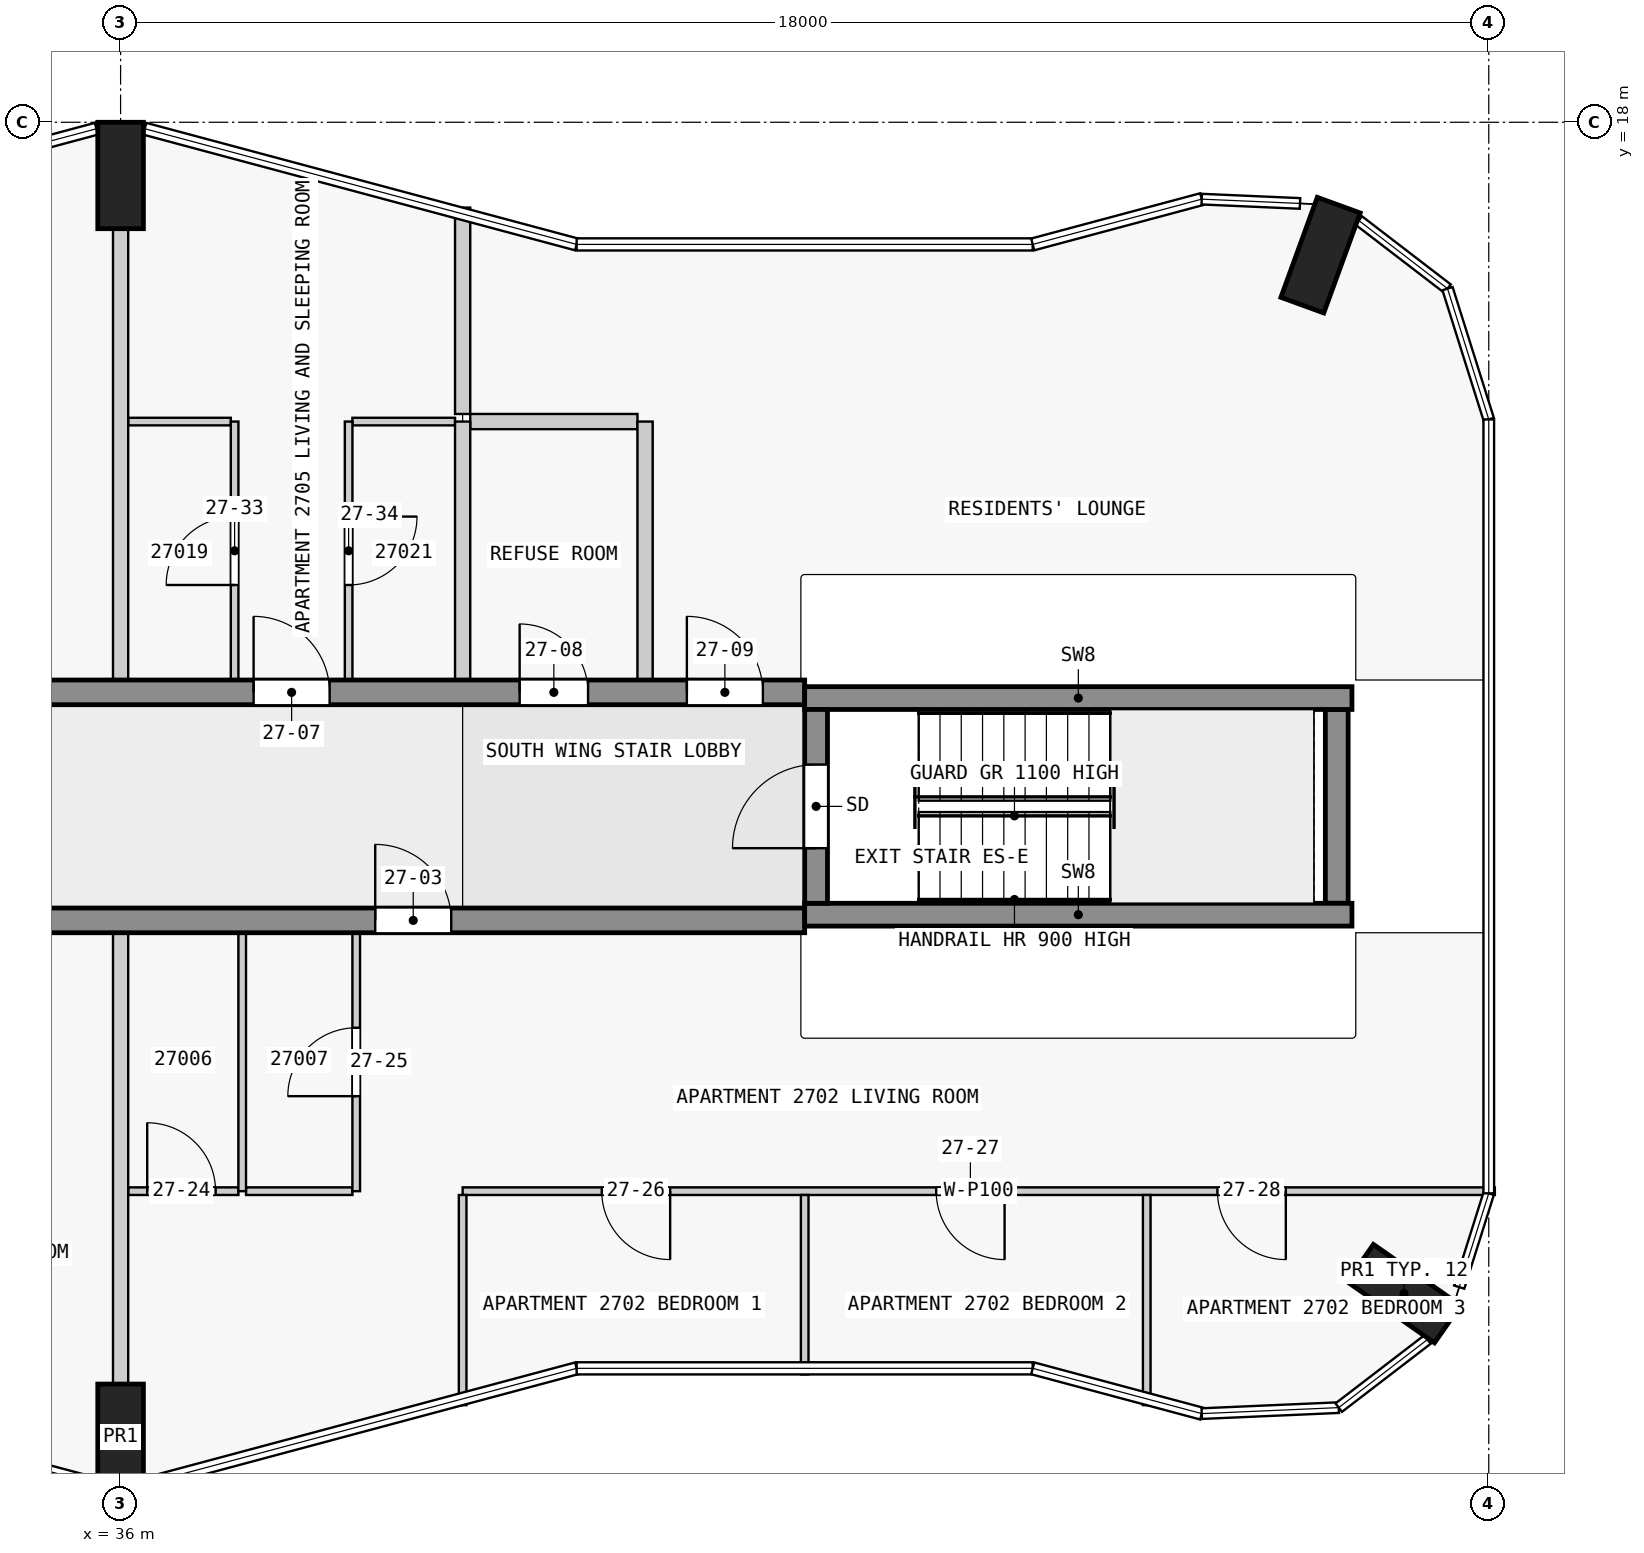
"""IFC4 building model, lengths in metres.
Left out: names, types, materials, properties, quantities, classifications, styles, units other than length and angle.
Written with IfcOpenShell. Run it as: python <this file> out.ifc"""

import sys

from ifc_helpers import new_model, si_unit, direction, frame, frame_2d, origin, origin_2d, place, context, subcontext, project, spatial, rectangle, extrude, element, fill, save


model = new_model("IFC4")
c1 = context("Model", 3, precision=1e-05, world=origin(), true_north=direction((0.0, 1.0)))
c2 = subcontext(c1, "Body", "Model", "MODEL_VIEW")
j1 = project(units=[si_unit("LENGTHUNIT", "METRE"), si_unit("PLANEANGLEUNIT", "RADIAN")], contexts=[c1])
p1 = place(None, origin())
s1 = spatial("IfcSite", under=j1, at=p1, CompositionType="ELEMENT")
p2 = place(p1, origin())
s2 = spatial("IfcBuilding", under=s1, at=p2, CompositionType="ELEMENT")
p3 = place(p2, frame((0.0, 0.0, 106.3)))
s3 = spatial("IfcBuildingStorey", under=s2, at=p3, CompositionType="ELEMENT", Elevation=106.3)
for number, where, z_axis, x_axis in (
    (1, (36.0, 0.7, 0.0), (0.0, 0.0, 1.0), (1.0, 0.0, 0.0)),
    (2, (52.884, 2.59, 0.0), (0.0, 0.0, 1.0), (0.574, 0.819, 0.0)),
    (3, (51.787, 16.252, 0.0), (0.0, 0.0, 1.0), (-0.94, 0.342, 0.0)),
    (4, (36.0, 17.3, 0.0), (0.0, 0.0, 1.0), (1.0, 0.0, 0.0)),
):
    element("IfcColumn", number, at=place(p3, frame(where, z_axis=z_axis, x_axis=x_axis)), inside=s3, PredefinedType="COLUMN", context=c2, shape_type="SweptSolid", body=[
        extrude(rectangle(XDim=0.6, YDim=1.4, at=origin_2d()), origin(), (0.0, 0.0, 1.0), 3.5),
    ])
p4 = place(p3, frame((45.15, 7.725, 0.0), z_axis=(0.0, 0.0, 1.0), x_axis=(0.0, 1.0, 0.0)))
e5 = element("IfcWall", 5, at=p4, inside=s3, PredefinedType="SHEAR", context=c2, shape_type="SweptSolid", body=[
    extrude(rectangle(XDim=2.55, YDim=0.3, at=frame_2d((1.275, 0.0))), origin(), (0.0, 0.0, 1.0), 3.5),
])
p5 = place(p4, frame((0.725, 0.0, 0.0)))
e6 = element("IfcOpeningElement", 6, at=p5, cuts=e5, PredefinedType="OPENING", context=c2, shape_type="SweptSolid", body=[
    extrude(rectangle(XDim=1.1, YDim=2.1, at=frame_2d((0.55, 1.05))), frame((0.0, 0.16, 0.0), z_axis=(0.0, -1.0, 0.0), x_axis=(1.0, 0.0, 0.0)), (0.0, 0.0, 1.0), 0.32),
])
p6 = place(p3, frame((52.0, 7.725, 0.0), z_axis=(0.0, 0.0, 1.0), x_axis=(0.0, 1.0, 0.0)))
e7 = element("IfcWall", 7, at=p6, inside=s3, PredefinedType="SHEAR", context=c2, shape_type="SweptSolid", body=[
    extrude(rectangle(XDim=2.55, YDim=0.3, at=frame_2d((1.275, 0.0))), origin(), (0.0, 0.0, 1.0), 3.5),
])
for number, where, z_axis, x_axis in (
    (8, (45.0, 7.575, 0.0), (0.0, 0.0, 1.0), (1.0, 0.0, 0.0)),
    (9, (45.0, 10.425, 0.0), (0.0, 0.0, 1.0), (1.0, 0.0, 0.0)),
):
    element("IfcWall", number, at=place(p3, frame(where, z_axis=z_axis, x_axis=x_axis)), inside=s3, PredefinedType="SHEAR", context=c2, shape_type="SweptSolid", body=[
        extrude(rectangle(XDim=7.2, YDim=0.3, at=frame_2d((3.6, 0.0))), origin(), (0.0, 0.0, 1.0), 3.5),
    ])
p7 = place(p3, frame((22.5, 7.5, 0.0), z_axis=(0.0, 0.0, 1.0), x_axis=(1.0, 0.0, 0.0)))
e10 = element("IfcWall", 10, at=p7, inside=s3, PredefinedType="SHEAR", context=c2, shape_type="SweptSolid", body=[
    extrude(rectangle(XDim=22.5, YDim=0.325, at=frame_2d((11.25, 0.0))), origin(), (0.0, 0.0, 1.0), 3.25),
])
p8 = place(p7, frame((4.05, 0.0, 0.0)))
e11 = element("IfcOpeningElement", 11, at=p8, cuts=e10, PredefinedType="OPENING", context=c2, shape_type="SweptSolid", body=[
    extrude(rectangle(XDim=1.0, YDim=2.1, at=frame_2d((0.5, 1.05))), frame((0.0, 0.172, 0.0), z_axis=(0.0, -1.0, 0.0), x_axis=(1.0, 0.0, 0.0)), (0.0, 0.0, 1.0), 0.345),
])
p9 = place(p7, frame((10.75, 0.0, 0.0)))
e12 = element("IfcOpeningElement", 12, at=p9, cuts=e10, PredefinedType="OPENING", context=c2, shape_type="SweptSolid", body=[
    extrude(rectangle(XDim=1.0, YDim=2.1, at=frame_2d((0.5, 1.05))), frame((0.0, 0.172, 0.0), z_axis=(0.0, -1.0, 0.0), x_axis=(1.0, 0.0, 0.0)), (0.0, 0.0, 1.0), 0.345),
])
p10 = place(p7, frame((16.85, 0.0, 0.0)))
e13 = element("IfcOpeningElement", 13, at=p10, cuts=e10, PredefinedType="OPENING", context=c2, shape_type="SweptSolid", body=[
    extrude(rectangle(XDim=1.0, YDim=2.1, at=frame_2d((0.5, 1.05))), frame((0.0, 0.172, 0.0), z_axis=(0.0, -1.0, 0.0), x_axis=(1.0, 0.0, 0.0)), (0.0, 0.0, 1.0), 0.345),
])
p11 = place(p3, frame((22.5, 10.5, 0.0), z_axis=(0.0, 0.0, 1.0), x_axis=(1.0, 0.0, 0.0)))
e14 = element("IfcWall", 14, at=p11, inside=s3, PredefinedType="SHEAR", context=c2, shape_type="SweptSolid", body=[
    extrude(rectangle(XDim=22.5, YDim=0.325, at=frame_2d((11.25, 0.0))), origin(), (0.0, 0.0, 1.0), 3.25),
])
p12 = place(p11, frame((1.75, 0.0, 0.0)))
e15 = element("IfcOpeningElement", 15, at=p12, cuts=e14, PredefinedType="OPENING", context=c2, shape_type="SweptSolid", body=[
    extrude(rectangle(XDim=1.0, YDim=2.1, at=frame_2d((0.5, 1.05))), frame((0.0, 0.172, 0.0), z_axis=(0.0, -1.0, 0.0), x_axis=(1.0, 0.0, 0.0)), (0.0, 0.0, 1.0), 0.345),
])
p13 = place(p11, frame((6.25, 0.0, 0.0)))
e16 = element("IfcOpeningElement", 16, at=p13, cuts=e14, PredefinedType="OPENING", context=c2, shape_type="SweptSolid", body=[
    extrude(rectangle(XDim=1.0, YDim=2.1, at=frame_2d((0.5, 1.05))), frame((0.0, 0.172, 0.0), z_axis=(0.0, -1.0, 0.0), x_axis=(1.0, 0.0, 0.0)), (0.0, 0.0, 1.0), 0.345),
])
p14 = place(p11, frame((10.85, 0.0, 0.0)))
e17 = element("IfcOpeningElement", 17, at=p14, cuts=e14, PredefinedType="OPENING", context=c2, shape_type="SweptSolid", body=[
    extrude(rectangle(XDim=0.9, YDim=2.1, at=frame_2d((0.45, 1.05))), frame((0.0, 0.172, 0.0), z_axis=(0.0, -1.0, 0.0), x_axis=(1.0, 0.0, 0.0)), (0.0, 0.0, 1.0), 0.345),
])
p15 = place(p11, frame((15.25, 0.0, 0.0)))
e18 = element("IfcOpeningElement", 18, at=p15, cuts=e14, PredefinedType="OPENING", context=c2, shape_type="SweptSolid", body=[
    extrude(rectangle(XDim=1.0, YDim=2.1, at=frame_2d((0.5, 1.05))), frame((0.0, 0.172, 0.0), z_axis=(0.0, -1.0, 0.0), x_axis=(1.0, 0.0, 0.0)), (0.0, 0.0, 1.0), 0.345),
])
p16 = place(p11, frame((18.75, 0.0, 0.0)))
e19 = element("IfcOpeningElement", 19, at=p16, cuts=e14, PredefinedType="OPENING", context=c2, shape_type="SweptSolid", body=[
    extrude(rectangle(XDim=0.9, YDim=2.1, at=frame_2d((0.45, 1.05))), frame((0.0, 0.172, 0.0), z_axis=(0.0, -1.0, 0.0), x_axis=(1.0, 0.0, 0.0)), (0.0, 0.0, 1.0), 0.345),
])
p17 = place(p11, frame((20.95, 0.0, 0.0)))
e20 = element("IfcOpeningElement", 20, at=p17, cuts=e14, PredefinedType="OPENING", context=c2, shape_type="SweptSolid", body=[
    extrude(rectangle(XDim=1.0, YDim=2.1, at=frame_2d((0.5, 1.05))), frame((0.0, 0.172, 0.0), z_axis=(0.0, -1.0, 0.0), x_axis=(1.0, 0.0, 0.0)), (0.0, 0.0, 1.0), 0.345),
])
p18 = place(p3, frame((54.08, 3.938, 0.0), z_axis=(0.0, 0.0, 1.0), x_axis=(-1.0, 0.0, 0.0)))
e21 = element("IfcWall", 21, at=p18, inside=s3, PredefinedType="PARTITIONING", context=c2, shape_type="SweptSolid", body=[
    extrude(rectangle(XDim=13.58, YDim=0.1, at=frame_2d((6.79, 0.0))), origin(), (0.0, 0.0, 1.0), 3.25),
])
p19 = place(p18, frame((10.85, 0.0, 0.0)))
e22 = element("IfcOpeningElement", 22, at=p19, cuts=e21, PredefinedType="OPENING", context=c2, shape_type="SweptSolid", body=[
    extrude(rectangle(XDim=0.9, YDim=2.1, at=frame_2d((0.45, 1.05))), frame((0.0, 0.06, 0.0), z_axis=(0.0, -1.0, 0.0), x_axis=(1.0, 0.0, 0.0)), (0.0, 0.0, 1.0), 0.12),
])
p20 = place(p18, frame((6.45, 0.0, 0.0)))
e23 = element("IfcOpeningElement", 23, at=p20, cuts=e21, PredefinedType="OPENING", context=c2, shape_type="SweptSolid", body=[
    extrude(rectangle(XDim=0.9, YDim=2.1, at=frame_2d((0.45, 1.05))), frame((0.0, 0.06, 0.0), z_axis=(0.0, -1.0, 0.0), x_axis=(1.0, 0.0, 0.0)), (0.0, 0.0, 1.0), 0.12),
])
p21 = place(p18, frame((2.75, 0.0, 0.0)))
e24 = element("IfcOpeningElement", 24, at=p21, cuts=e21, PredefinedType="OPENING", context=c2, shape_type="SweptSolid", body=[
    extrude(rectangle(XDim=0.9, YDim=2.1, at=frame_2d((0.45, 1.05))), frame((0.0, 0.06, 0.0), z_axis=(0.0, -1.0, 0.0), x_axis=(1.0, 0.0, 0.0)), (0.0, 0.0, 1.0), 0.12),
])
p22 = place(p3, frame((36.1, 3.938, 0.0), z_axis=(0.0, 0.0, 1.0), x_axis=(1.0, 0.0, 0.0)))
e25 = element("IfcWall", 25, at=p22, inside=s3, PredefinedType="PARTITIONING", context=c2, shape_type="SweptSolid", body=[
    extrude(rectangle(XDim=1.45, YDim=0.1, at=frame_2d((0.725, 0.0))), origin(), (0.0, 0.0, 1.0), 3.25),
])
p23 = place(p22, frame((0.25, 0.0, 0.0)))
e26 = element("IfcOpeningElement", 26, at=p23, cuts=e25, PredefinedType="OPENING", context=c2, shape_type="SweptSolid", body=[
    extrude(rectangle(XDim=0.9, YDim=2.1, at=frame_2d((0.45, 1.05))), frame((0.0, 0.06, 0.0), z_axis=(0.0, -1.0, 0.0), x_axis=(1.0, 0.0, 0.0)), (0.0, 0.0, 1.0), 0.12),
])
p24 = place(p3, frame((37.65, 3.938, 0.0), z_axis=(0.0, 0.0, 1.0), x_axis=(1.0, 0.0, 0.0)))
e27 = element("IfcWall", 27, at=p24, inside=s3, PredefinedType="PARTITIONING", context=c2, shape_type="SweptSolid", body=[
    extrude(rectangle(XDim=1.4, YDim=0.1, at=frame_2d((0.7, 0.0))), origin(), (0.0, 0.0, 1.0), 3.25),
])
for number, where, z_axis, x_axis in (
    (28, (37.45, 14.062, 0.0), (0.0, 0.0, 1.0), (-1.0, 0.0, 0.0)),
    (29, (40.4, 14.062, 0.0), (0.0, 0.0, 1.0), (-1.0, 0.0, 0.0)),
):
    element("IfcWall", number, at=place(p3, frame(where, z_axis=z_axis, x_axis=x_axis)), inside=s3, PredefinedType="PARTITIONING", context=c2, shape_type="SweptSolid", body=[
        extrude(rectangle(XDim=1.35, YDim=0.1, at=frame_2d((0.675, 0.0))), origin(), (0.0, 0.0, 1.0), 3.25),
    ])
p25 = place(p3, frame((42.8, 14.062, 0.0), z_axis=(0.0, 0.0, 1.0), x_axis=(-1.0, 0.0, 0.0)))
e30 = element("IfcWall", 30, at=p25, inside=s3, PredefinedType="PARTITIONING", context=c2, shape_type="SweptSolid", body=[
    extrude(rectangle(XDim=2.2, YDim=0.2, at=frame_2d((1.1, 0.0))), origin(), (0.0, 0.0, 1.0), 3.25),
])
for number, where, z_axis, x_axis in (
    (31, (36.0, 1.4, 0.0), (0.0, 0.0, 1.0), (0.0, 1.0, 0.0)),
    (32, (36.0, 10.663, 0.0), (0.0, 0.0, 1.0), (0.0, 1.0, 0.0)),
):
    element("IfcWall", number, at=place(p3, frame(where, z_axis=z_axis, x_axis=x_axis)), inside=s3, PredefinedType="PARTITIONING", context=c2, shape_type="SweptSolid", body=[
        extrude(rectangle(XDim=5.938, YDim=0.2, at=frame_2d((2.969, 0.0))), origin(), (0.0, 0.0, 1.0), 3.25),
    ])
p26 = place(p3, frame((37.5, 10.663, 0.0), z_axis=(0.0, 0.0, 1.0), x_axis=(0.0, 1.0, 0.0)))
e33 = element("IfcWall", 33, at=p26, inside=s3, PredefinedType="PARTITIONING", context=c2, shape_type="SweptSolid", body=[
    extrude(rectangle(XDim=3.4, YDim=0.1, at=frame_2d((1.7, 0.0))), origin(), (0.0, 0.0, 1.0), 3.25),
])
p27 = place(p26, frame((1.25, 0.0, 0.0)))
e34 = element("IfcOpeningElement", 34, at=p27, cuts=e33, PredefinedType="OPENING", context=c2, shape_type="SweptSolid", body=[
    extrude(rectangle(XDim=0.9, YDim=2.1, at=frame_2d((0.45, 1.05))), frame((0.0, 0.06, 0.0), z_axis=(0.0, -1.0, 0.0), x_axis=(1.0, 0.0, 0.0)), (0.0, 0.0, 1.0), 0.12),
])
p28 = place(p3, frame((37.6, 3.938, 0.0), z_axis=(0.0, 0.0, 1.0), x_axis=(0.0, 1.0, 0.0)))
e35 = element("IfcWall", 35, at=p28, inside=s3, PredefinedType="PARTITIONING", context=c2, shape_type="SweptSolid", body=[
    extrude(rectangle(XDim=3.4, YDim=0.1, at=frame_2d((1.7, 0.0))), origin(), (0.0, 0.0, 1.0), 3.25),
])
p29 = place(p3, frame((39.0, 14.062, 0.0), z_axis=(0.0, 0.0, 1.0), x_axis=(0.0, -1.0, 0.0)))
e36 = element("IfcWall", 36, at=p29, inside=s3, PredefinedType="PARTITIONING", context=c2, shape_type="SweptSolid", body=[
    extrude(rectangle(XDim=3.4, YDim=0.1, at=frame_2d((1.7, 0.0))), origin(), (0.0, 0.0, 1.0), 3.25),
])
p30 = place(p29, frame((1.25, 0.0, 0.0)))
e37 = element("IfcOpeningElement", 37, at=p30, cuts=e36, PredefinedType="OPENING", context=c2, shape_type="SweptSolid", body=[
    extrude(rectangle(XDim=0.9, YDim=2.1, at=frame_2d((0.45, 1.05))), frame((0.0, 0.06, 0.0), z_axis=(0.0, -1.0, 0.0), x_axis=(1.0, 0.0, 0.0)), (0.0, 0.0, 1.0), 0.12),
])
p31 = place(p3, frame((39.1, 3.938, 0.0), z_axis=(0.0, 0.0, 1.0), x_axis=(0.0, 1.0, 0.0)))
e38 = element("IfcWall", 38, at=p31, inside=s3, PredefinedType="PARTITIONING", context=c2, shape_type="SweptSolid", body=[
    extrude(rectangle(XDim=3.4, YDim=0.1, at=frame_2d((1.7, 0.0))), origin(), (0.0, 0.0, 1.0), 3.25),
])
p32 = place(p31, frame((1.25, 0.0, 0.0)))
e39 = element("IfcOpeningElement", 39, at=p32, cuts=e38, PredefinedType="OPENING", context=c2, shape_type="SweptSolid", body=[
    extrude(rectangle(XDim=0.9, YDim=2.1, at=frame_2d((0.45, 1.05))), frame((0.0, 0.06, 0.0), z_axis=(0.0, -1.0, 0.0), x_axis=(1.0, 0.0, 0.0)), (0.0, 0.0, 1.0), 0.12),
])
p33 = place(p3, frame((40.5, 3.887, 0.0), z_axis=(0.0, 0.0, 1.0), x_axis=(0.0, -1.0, 0.0)))
e40 = element("IfcWall", 40, at=p33, inside=s3, PredefinedType="PARTITIONING", context=c2, shape_type="SweptSolid", body=[
    extrude(rectangle(XDim=2.765, YDim=0.1, at=frame_2d((1.383, 0.0))), origin(), (0.0, 0.0, 1.0), 3.25),
])
p34 = place(p3, frame((40.5, 16.878, 0.0), z_axis=(0.0, 0.0, 1.0), x_axis=(0.0, -1.0, 0.0)))
e41 = element("IfcWall", 41, at=p34, inside=s3, PredefinedType="PARTITIONING", context=c2, shape_type="SweptSolid", body=[
    extrude(rectangle(XDim=2.715, YDim=0.2, at=frame_2d((1.357, 0.0))), origin(), (0.0, 0.0, 1.0), 3.25),
])
for number, where, z_axis, x_axis in (
    (42, (40.5, 10.663, 0.0), (0.0, 0.0, 1.0), (0.0, 1.0, 0.0)),
    (43, (42.9, 10.663, 0.0), (0.0, 0.0, 1.0), (0.0, 1.0, 0.0)),
):
    element("IfcWall", number, at=place(p3, frame(where, z_axis=z_axis, x_axis=x_axis)), inside=s3, PredefinedType="PARTITIONING", context=c2, shape_type="SweptSolid", body=[
        extrude(rectangle(XDim=3.4, YDim=0.2, at=frame_2d((1.7, 0.0))), origin(), (0.0, 0.0, 1.0), 3.25),
    ])
p35 = place(p3, frame((45.0, 1.527, 0.0), z_axis=(0.0, 0.0, 1.0), x_axis=(0.0, 1.0, 0.0)))
e44 = element("IfcWall", 44, at=p35, inside=s3, PredefinedType="PARTITIONING", context=c2, shape_type="SweptSolid", body=[
    extrude(rectangle(XDim=2.361, YDim=0.1, at=frame_2d((1.18, 0.0))), origin(), (0.0, 0.0, 1.0), 3.25),
])
p36 = place(p3, frame((49.5, 1.122, 0.0), z_axis=(0.0, 0.0, 1.0), x_axis=(0.0, 1.0, 0.0)))
e45 = element("IfcWall", 45, at=p36, inside=s3, PredefinedType="PARTITIONING", context=c2, shape_type="SweptSolid", body=[
    extrude(rectangle(XDim=2.765, YDim=0.1, at=frame_2d((1.383, 0.0))), origin(), (0.0, 0.0, 1.0), 3.25),
])
p37 = place(p5, origin())
e46 = element("IfcDoor", 46, at=p37, inside=s3, OperationType="SINGLE_SWING_LEFT", PredefinedType="DOOR", context=c2, shape_type="SweptSolid", body=[
    extrude(rectangle(XDim=1.1, YDim=2.1, at=frame_2d((0.55, 1.05))), frame((0.0, 0.025, 0.0), z_axis=(0.0, -1.0, 0.0), x_axis=(1.0, 0.0, 0.0)), (0.0, 0.0, 1.0), 0.05),
])
fill(e6, e46)
p38 = place(p10, origin())
e47 = element("IfcDoor", 47, at=p38, inside=s3, OperationType="SINGLE_SWING_RIGHT", PredefinedType="DOOR", context=c2, shape_type="SweptSolid", body=[
    extrude(rectangle(XDim=1.0, YDim=2.1, at=frame_2d((0.5, 1.05))), frame((0.0, 0.025, 0.0), z_axis=(0.0, -1.0, 0.0), x_axis=(1.0, 0.0, 0.0)), (0.0, 0.0, 1.0), 0.05),
])
fill(e13, e47)
p39 = place(p15, origin())
e48 = element("IfcDoor", 48, at=p39, inside=s3, OperationType="SINGLE_SWING_RIGHT", PredefinedType="DOOR", context=c2, shape_type="SweptSolid", body=[
    extrude(rectangle(XDim=1.0, YDim=2.1, at=frame_2d((0.5, 1.05))), frame((0.0, 0.025, 0.0), z_axis=(0.0, -1.0, 0.0), x_axis=(1.0, 0.0, 0.0)), (0.0, 0.0, 1.0), 0.05),
])
fill(e18, e48)
p40 = place(p16, origin())
e49 = element("IfcDoor", 49, at=p40, inside=s3, OperationType="SINGLE_SWING_RIGHT", PredefinedType="DOOR", context=c2, shape_type="SweptSolid", body=[
    extrude(rectangle(XDim=0.9, YDim=2.1, at=frame_2d((0.45, 1.05))), frame((0.0, 0.025, 0.0), z_axis=(0.0, -1.0, 0.0), x_axis=(1.0, 0.0, 0.0)), (0.0, 0.0, 1.0), 0.05),
])
fill(e19, e49)
p41 = place(p17, origin())
e50 = element("IfcDoor", 50, at=p41, inside=s3, OperationType="SINGLE_SWING_RIGHT", PredefinedType="DOOR", context=c2, shape_type="SweptSolid", body=[
    extrude(rectangle(XDim=1.0, YDim=2.1, at=frame_2d((0.5, 1.05))), frame((0.0, 0.025, 0.0), z_axis=(0.0, -1.0, 0.0), x_axis=(1.0, 0.0, 0.0)), (0.0, 0.0, 1.0), 0.05),
])
fill(e20, e50)
p42 = place(p23, origin())
e51 = element("IfcDoor", 51, at=p42, inside=s3, OperationType="SINGLE_SWING_LEFT", PredefinedType="DOOR", context=c2, shape_type="SweptSolid", body=[
    extrude(rectangle(XDim=0.9, YDim=2.1, at=frame_2d((0.45, 1.05))), frame((0.0, 0.025, 0.0), z_axis=(0.0, -1.0, 0.0), x_axis=(1.0, 0.0, 0.0)), (0.0, 0.0, 1.0), 0.05),
])
fill(e26, e51)
p43 = place(p32, origin())
e52 = element("IfcDoor", 52, at=p43, inside=s3, OperationType="SINGLE_SWING_LEFT", PredefinedType="DOOR", context=c2, shape_type="SweptSolid", body=[
    extrude(rectangle(XDim=0.9, YDim=2.1, at=frame_2d((0.45, 1.05))), frame((0.0, 0.025, 0.0), z_axis=(0.0, -1.0, 0.0), x_axis=(1.0, 0.0, 0.0)), (0.0, 0.0, 1.0), 0.05),
])
fill(e39, e52)
p44 = place(p19, origin())
e53 = element("IfcDoor", 53, at=p44, inside=s3, OperationType="SINGLE_SWING_RIGHT", PredefinedType="DOOR", context=c2, shape_type="SweptSolid", body=[
    extrude(rectangle(XDim=0.9, YDim=2.1, at=frame_2d((0.45, 1.05))), frame((0.0, 0.025, 0.0), z_axis=(0.0, -1.0, 0.0), x_axis=(1.0, 0.0, 0.0)), (0.0, 0.0, 1.0), 0.05),
])
fill(e22, e53)
p45 = place(p20, origin())
e54 = element("IfcDoor", 54, at=p45, inside=s3, OperationType="SINGLE_SWING_RIGHT", PredefinedType="DOOR", context=c2, shape_type="SweptSolid", body=[
    extrude(rectangle(XDim=0.9, YDim=2.1, at=frame_2d((0.45, 1.05))), frame((0.0, 0.025, 0.0), z_axis=(0.0, -1.0, 0.0), x_axis=(1.0, 0.0, 0.0)), (0.0, 0.0, 1.0), 0.05),
])
fill(e23, e54)
p46 = place(p21, origin())
e55 = element("IfcDoor", 55, at=p46, inside=s3, OperationType="SINGLE_SWING_LEFT", PredefinedType="DOOR", context=c2, shape_type="SweptSolid", body=[
    extrude(rectangle(XDim=0.9, YDim=2.1, at=frame_2d((0.45, 1.05))), frame((0.0, 0.025, 0.0), z_axis=(0.0, -1.0, 0.0), x_axis=(1.0, 0.0, 0.0)), (0.0, 0.0, 1.0), 0.05),
])
fill(e24, e55)
p47 = place(p27, origin())
e56 = element("IfcDoor", 56, at=p47, inside=s3, OperationType="SINGLE_SWING_LEFT", PredefinedType="DOOR", context=c2, shape_type="SweptSolid", body=[
    extrude(rectangle(XDim=0.9, YDim=2.1, at=frame_2d((0.45, 1.05))), frame((0.0, 0.025, 0.0), z_axis=(0.0, -1.0, 0.0), x_axis=(1.0, 0.0, 0.0)), (0.0, 0.0, 1.0), 0.05),
])
fill(e34, e56)
p48 = place(p30, origin())
e57 = element("IfcDoor", 57, at=p48, inside=s3, OperationType="SINGLE_SWING_LEFT", PredefinedType="DOOR", context=c2, shape_type="SweptSolid", body=[
    extrude(rectangle(XDim=0.9, YDim=2.1, at=frame_2d((0.45, 1.05))), frame((0.0, 0.025, 0.0), z_axis=(0.0, -1.0, 0.0), x_axis=(1.0, 0.0, 0.0)), (0.0, 0.0, 1.0), 0.05),
])
fill(e37, e57)
save(model, sys.argv[1])
